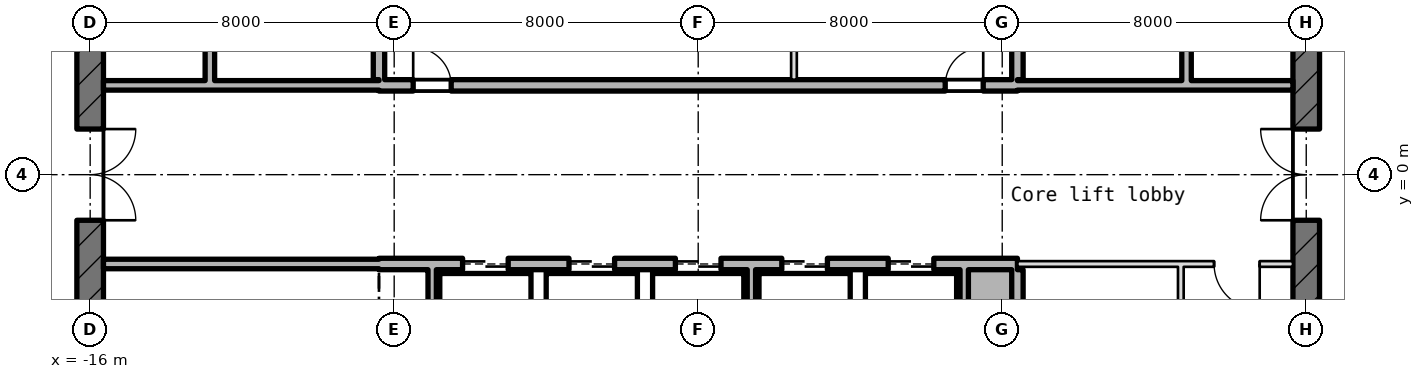
"""IFC4 building model, lengths in metres.
Left out: names, types, materials, properties, quantities, classifications, styles, units other than length and angle.
Written with IfcOpenShell. Run it as: python <this file> out.ifc"""

import sys

from ifc_helpers import new_model, si_unit, direction, frame, frame_2d, origin, place, context, subcontext, project, spatial, rectangle, extrude, element, fill, save


model = new_model("IFC4")
c1 = context("Model", 3, precision=1e-05, world=origin(), true_north=direction((0.0, 1.0)))
c2 = subcontext(c1, "Body", "Model", "MODEL_VIEW")
j1 = project(units=[si_unit("LENGTHUNIT", "METRE"), si_unit("PLANEANGLEUNIT", "RADIAN")], contexts=[c1])
p1 = place(None, origin())
s1 = spatial("IfcSite", under=j1, at=p1, CompositionType="ELEMENT")
p2 = place(p1, origin())
s2 = spatial("IfcBuilding", under=s1, at=p2, CompositionType="ELEMENT")
p3 = place(p2, frame((0.0, 0.0, 321.85)))
s3 = spatial("IfcBuildingStorey", under=s2, at=p3, CompositionType="ELEMENT", Elevation=321.85)
p4 = place(p3, frame((16.0, -10.145, -0.18), z_axis=(0.0, 0.0, 1.0), x_axis=(0.0, 1.0, 0.0)))
e1 = element("IfcWall", 1, at=p4, inside=s3, PredefinedType="SHEAR", context=c2, shape_type="SweptSolid", body=[
    extrude(rectangle(XDim=20.29, YDim=0.7, at=frame_2d((10.145, 0.0))), origin(), (0.0, 0.0, 1.0), 4.15),
])
p5 = place(p4, frame((8.945, 0.0, 0.18)))
e2 = element("IfcOpeningElement", 2, at=p5, cuts=e1, PredefinedType="OPENING", context=c2, shape_type="SweptSolid", body=[
    extrude(rectangle(XDim=2.4, YDim=2.1, at=frame_2d((1.2, 1.05))), frame((0.0, 0.36, 0.0), z_axis=(0.0, -1.0, 0.0), x_axis=(1.0, 0.0, 0.0)), (0.0, 0.0, 1.0), 0.72),
])
p6 = place(p4, frame((13.545, 0.0, 0.18)))
e3 = element("IfcOpeningElement", 3, at=p6, cuts=e1, PredefinedType="OPENING", context=c2, shape_type="SweptSolid", body=[
    extrude(rectangle(XDim=1.2, YDim=2.1, at=frame_2d((0.6, 1.05))), frame((0.0, 0.36, 0.0), z_axis=(0.0, -1.0, 0.0), x_axis=(1.0, 0.0, 0.0)), (0.0, 0.0, 1.0), 0.72),
])
p7 = place(p3, frame((-16.0, 10.145, -0.18), z_axis=(0.0, 0.0, 1.0), x_axis=(0.0, -1.0, 0.0)))
e4 = element("IfcWall", 4, at=p7, inside=s3, PredefinedType="SHEAR", context=c2, shape_type="SweptSolid", body=[
    extrude(rectangle(XDim=20.29, YDim=0.7, at=frame_2d((10.145, 0.0))), origin(), (0.0, 0.0, 1.0), 4.15),
])
p8 = place(p7, frame((8.945, 0.0, 0.18)))
e5 = element("IfcOpeningElement", 5, at=p8, cuts=e4, PredefinedType="OPENING", context=c2, shape_type="SweptSolid", body=[
    extrude(rectangle(XDim=2.4, YDim=2.1, at=frame_2d((1.2, 1.05))), frame((0.0, 0.36, 0.0), z_axis=(0.0, -1.0, 0.0), x_axis=(1.0, 0.0, 0.0)), (0.0, 0.0, 1.0), 0.72),
])
p9 = place(p7, frame((5.545, 0.0, 0.18)))
e6 = element("IfcOpeningElement", 6, at=p9, cuts=e4, PredefinedType="OPENING", context=c2, shape_type="SweptSolid", body=[
    extrude(rectangle(XDim=1.2, YDim=2.1, at=frame_2d((0.6, 1.05))), frame((0.0, 0.36, 0.0), z_axis=(0.0, -1.0, 0.0), x_axis=(1.0, 0.0, 0.0)), (0.0, 0.0, 1.0), 0.72),
])
p10 = place(p3, frame((-15.65, -2.35, 0.0), z_axis=(0.0, 0.0, 1.0), x_axis=(1.0, 0.0, 0.0)))
e7 = element("IfcWall", 7, at=p10, inside=s3, PredefinedType="STANDARD", context=c2, shape_type="SweptSolid", body=[
    extrude(rectangle(XDim=7.25, YDim=0.25, at=frame_2d((3.625, 0.0))), origin(), (0.0, 0.0, 1.0), 3.97),
])
p11 = place(p3, frame((-8.4, -2.35, -0.18), z_axis=(0.0, 0.0, 1.0), x_axis=(1.0, 0.0, 0.0)))
e8 = element("IfcWall", 8, at=p11, inside=s3, PredefinedType="SHEAR", context=c2, shape_type="SweptSolid", body=[
    extrude(rectangle(XDim=16.8, YDim=0.3, at=frame_2d((8.4, 0.0))), origin(), (0.0, 0.0, 1.0), 4.15),
])
p12 = place(p11, frame((2.2, 0.0, 0.18)))
e9 = element("IfcOpeningElement", 9, at=p12, cuts=e8, PredefinedType="OPENING", context=c2, shape_type="SweptSolid", body=[
    extrude(rectangle(XDim=1.2, YDim=2.1, at=frame_2d((0.6, 1.05))), frame((0.0, 0.16, 0.0), z_axis=(0.0, -1.0, 0.0), x_axis=(1.0, 0.0, 0.0)), (0.0, 0.0, 1.0), 0.32),
])
p13 = place(p11, frame((5.0, 0.0, 0.18)))
e10 = element("IfcOpeningElement", 10, at=p13, cuts=e8, PredefinedType="OPENING", context=c2, shape_type="SweptSolid", body=[
    extrude(rectangle(XDim=1.2, YDim=2.1, at=frame_2d((0.6, 1.05))), frame((0.0, 0.16, 0.0), z_axis=(0.0, -1.0, 0.0), x_axis=(1.0, 0.0, 0.0)), (0.0, 0.0, 1.0), 0.32),
])
p14 = place(p11, frame((7.8, 0.0, 0.18)))
e11 = element("IfcOpeningElement", 11, at=p14, cuts=e8, PredefinedType="OPENING", context=c2, shape_type="SweptSolid", body=[
    extrude(rectangle(XDim=1.2, YDim=2.1, at=frame_2d((0.6, 1.05))), frame((0.0, 0.16, 0.0), z_axis=(0.0, -1.0, 0.0), x_axis=(1.0, 0.0, 0.0)), (0.0, 0.0, 1.0), 0.32),
])
p15 = place(p11, frame((10.6, 0.0, 0.18)))
e12 = element("IfcOpeningElement", 12, at=p15, cuts=e8, PredefinedType="OPENING", context=c2, shape_type="SweptSolid", body=[
    extrude(rectangle(XDim=1.2, YDim=2.1, at=frame_2d((0.6, 1.05))), frame((0.0, 0.16, 0.0), z_axis=(0.0, -1.0, 0.0), x_axis=(1.0, 0.0, 0.0)), (0.0, 0.0, 1.0), 0.32),
])
p16 = place(p11, frame((13.4, 0.0, 0.18)))
e13 = element("IfcOpeningElement", 13, at=p16, cuts=e8, PredefinedType="OPENING", context=c2, shape_type="SweptSolid", body=[
    extrude(rectangle(XDim=1.2, YDim=2.1, at=frame_2d((0.6, 1.05))), frame((0.0, 0.16, 0.0), z_axis=(0.0, -1.0, 0.0), x_axis=(1.0, 0.0, 0.0)), (0.0, 0.0, 1.0), 0.32),
])
p17 = place(p3, frame((8.4, -2.35, 0.0), z_axis=(0.0, 0.0, 1.0), x_axis=(1.0, 0.0, 0.0)))
e14 = element("IfcWall", 14, at=p17, inside=s3, PredefinedType="PARTITIONING", context=c2, shape_type="SweptSolid", body=[
    extrude(rectangle(XDim=7.25, YDim=0.15, at=frame_2d((3.625, 0.0))), origin(), (0.0, 0.0, 1.0), 3.97),
])
p18 = place(p17, frame((5.175, 0.0, 0.0)))
e15 = element("IfcOpeningElement", 15, at=p18, cuts=e14, PredefinedType="OPENING", context=c2, shape_type="SweptSolid", body=[
    extrude(rectangle(XDim=1.2, YDim=2.1, at=frame_2d((0.6, 1.05))), frame((0.0, 0.085, 0.0), z_axis=(0.0, -1.0, 0.0), x_axis=(1.0, 0.0, 0.0)), (0.0, 0.0, 1.0), 0.17),
])
p19 = place(p3, frame((-15.65, 2.35, 0.0), z_axis=(0.0, 0.0, 1.0), x_axis=(1.0, 0.0, 0.0)))
e16 = element("IfcWall", 16, at=p19, inside=s3, PredefinedType="STANDARD", context=c2, shape_type="SweptSolid", body=[
    extrude(rectangle(XDim=7.25, YDim=0.25, at=frame_2d((3.625, 0.0))), origin(), (0.0, 0.0, 1.0), 3.97),
])
p20 = place(p3, frame((-8.4, 2.35, -0.18), z_axis=(0.0, 0.0, 1.0), x_axis=(1.0, 0.0, 0.0)))
e17 = element("IfcWall", 17, at=p20, inside=s3, PredefinedType="SHEAR", context=c2, shape_type="SweptSolid", body=[
    extrude(rectangle(XDim=16.8, YDim=0.3, at=frame_2d((8.4, 0.0))), origin(), (0.0, 0.0, 1.0), 4.15),
])
p21 = place(p20, frame((0.9, 0.0, 0.18)))
e18 = element("IfcOpeningElement", 18, at=p21, cuts=e17, PredefinedType="OPENING", context=c2, shape_type="SweptSolid", body=[
    extrude(rectangle(XDim=1.0, YDim=2.1, at=frame_2d((0.5, 1.05))), frame((0.0, 0.16, 0.0), z_axis=(0.0, -1.0, 0.0), x_axis=(1.0, 0.0, 0.0)), (0.0, 0.0, 1.0), 0.32),
])
p22 = place(p20, frame((14.9, 0.0, 0.18)))
e19 = element("IfcOpeningElement", 19, at=p22, cuts=e17, PredefinedType="OPENING", context=c2, shape_type="SweptSolid", body=[
    extrude(rectangle(XDim=1.0, YDim=2.1, at=frame_2d((0.5, 1.05))), frame((0.0, 0.16, 0.0), z_axis=(0.0, -1.0, 0.0), x_axis=(1.0, 0.0, 0.0)), (0.0, 0.0, 1.0), 0.32),
])
p23 = place(p3, frame((8.4, 2.35, 0.0), z_axis=(0.0, 0.0, 1.0), x_axis=(1.0, 0.0, 0.0)))
e20 = element("IfcWall", 20, at=p23, inside=s3, PredefinedType="STANDARD", context=c2, shape_type="SweptSolid", body=[
    extrude(rectangle(XDim=7.25, YDim=0.25, at=frame_2d((3.625, 0.0))), origin(), (0.0, 0.0, 1.0), 3.97),
])
p24 = place(p3, frame((-12.85, 2.475, 0.0), z_axis=(0.0, 0.0, 1.0), x_axis=(0.0, 1.0, 0.0)))
e21 = element("IfcWall", 21, at=p24, inside=s3, PredefinedType="STANDARD", context=c2, shape_type="SweptSolid", body=[
    extrude(rectangle(XDim=3.05, YDim=0.25, at=frame_2d((1.525, 0.0))), origin(), (0.0, 0.0, 1.0), 3.97),
])
p25 = place(p3, frame((-8.4, 2.5, -0.18), z_axis=(0.0, 0.0, 1.0), x_axis=(0.0, 1.0, 0.0)))
e22 = element("IfcWall", 22, at=p25, inside=s3, PredefinedType="SHEAR", context=c2, shape_type="SweptSolid", body=[
    extrude(rectangle(XDim=5.85, YDim=0.3, at=frame_2d((2.925, 0.0))), origin(), (0.0, 0.0, 1.0), 4.15),
])
for number, where, z_axis, x_axis in (
    (23, (-7.0, -5.24, 0.0), (0.0, 0.0, 1.0), (0.0, 1.0, 0.0)),
    (24, (1.4, -5.24, 0.0), (0.0, 0.0, 1.0), (0.0, 1.0, 0.0)),
):
    element("IfcWall", number, at=place(p3, frame(where, z_axis=z_axis, x_axis=x_axis)), inside=s3, PredefinedType="STANDARD", context=c2, shape_type="SweptSolid", body=[
        extrude(rectangle(XDim=2.74, YDim=0.22, at=frame_2d((1.37, 0.0))), origin(), (0.0, 0.0, 1.0), 3.97),
    ])
p26 = place(p3, frame((2.52, 2.5, 0.0), z_axis=(0.0, 0.0, 1.0), x_axis=(0.0, 1.0, 0.0)))
e25 = element("IfcWall", 25, at=p26, inside=s3, PredefinedType="PARTITIONING", context=c2, shape_type="SweptSolid", body=[
    extrude(rectangle(XDim=2.775, YDim=0.15, at=frame_2d((1.387, 0.0))), origin(), (0.0, 0.0, 1.0), 3.97),
])
p27 = place(p3, frame((7.0, -5.24, 0.0), z_axis=(0.0, 0.0, 1.0), x_axis=(0.0, 1.0, 0.0)))
e26 = element("IfcWall", 26, at=p27, inside=s3, PredefinedType="STANDARD", context=c2, shape_type="SweptSolid", body=[
    extrude(rectangle(XDim=2.74, YDim=0.22, at=frame_2d((1.37, 0.0))), origin(), (0.0, 0.0, 1.0), 3.97),
])
for number, where, z_axis, x_axis in (
    (27, (8.4, -8.35, -0.18), (0.0, 0.0, 1.0), (0.0, 1.0, 0.0)),
    (28, (8.4, 2.5, -0.18), (0.0, 0.0, 1.0), (0.0, 1.0, 0.0)),
):
    element("IfcWall", number, at=place(p3, frame(where, z_axis=z_axis, x_axis=x_axis)), inside=s3, PredefinedType="SHEAR", context=c2, shape_type="SweptSolid", body=[
        extrude(rectangle(XDim=5.85, YDim=0.3, at=frame_2d((2.925, 0.0))), origin(), (0.0, 0.0, 1.0), 4.15),
    ])
p28 = place(p3, frame((12.7, -12.65, 0.0), z_axis=(0.0, 0.0, 1.0), x_axis=(0.0, 1.0, 0.0)))
e29 = element("IfcWall", 29, at=p28, inside=s3, PredefinedType="PARTITIONING", context=c2, shape_type="SweptSolid", body=[
    extrude(rectangle(XDim=10.225, YDim=0.15, at=frame_2d((5.112, 0.0))), origin(), (0.0, 0.0, 1.0), 3.97),
])
p29 = place(p28, frame((7.975, 0.0, 0.0)))
e30 = element("IfcOpeningElement", 30, at=p29, cuts=e29, PredefinedType="OPENING", context=c2, shape_type="SweptSolid", body=[
    extrude(rectangle(XDim=1.0, YDim=2.1, at=frame_2d((0.5, 1.05))), frame((0.0, 0.085, 0.0), z_axis=(0.0, -1.0, 0.0), x_axis=(1.0, 0.0, 0.0)), (0.0, 0.0, 1.0), 0.17),
])
p30 = place(p28, frame((2.825, 0.0, 0.0)))
e31 = element("IfcOpeningElement", 31, at=p30, cuts=e29, PredefinedType="OPENING", context=c2, shape_type="SweptSolid", body=[
    extrude(rectangle(XDim=1.0, YDim=2.1, at=frame_2d((0.5, 1.05))), frame((0.0, 0.085, 0.0), z_axis=(0.0, -1.0, 0.0), x_axis=(1.0, 0.0, 0.0)), (0.0, 0.0, 1.0), 0.17),
])
p31 = place(p3, frame((12.85, 2.475, 0.0), z_axis=(0.0, 0.0, 1.0), x_axis=(0.0, 1.0, 0.0)))
e32 = element("IfcWall", 32, at=p31, inside=s3, PredefinedType="STANDARD", context=c2, shape_type="SweptSolid", body=[
    extrude(rectangle(XDim=3.05, YDim=0.25, at=frame_2d((1.525, 0.0))), origin(), (0.0, 0.0, 1.0), 3.97),
])
p32 = place(p12, origin())
e33 = element("IfcDoor", 33, at=p32, inside=s3, OperationType="DOUBLE_DOOR_SLIDING", PredefinedType="DOOR", context=c2, shape_type="SweptSolid", body=[
    extrude(rectangle(XDim=1.2, YDim=2.1, at=frame_2d((0.6, 1.05))), frame((0.0, 0.025, 0.0), z_axis=(0.0, -1.0, 0.0), x_axis=(1.0, 0.0, 0.0)), (0.0, 0.0, 1.0), 0.05),
])
fill(e9, e33)
p33 = place(p13, origin())
e34 = element("IfcDoor", 34, at=p33, inside=s3, OperationType="DOUBLE_DOOR_SLIDING", PredefinedType="DOOR", context=c2, shape_type="SweptSolid", body=[
    extrude(rectangle(XDim=1.2, YDim=2.1, at=frame_2d((0.6, 1.05))), frame((0.0, 0.025, 0.0), z_axis=(0.0, -1.0, 0.0), x_axis=(1.0, 0.0, 0.0)), (0.0, 0.0, 1.0), 0.05),
])
fill(e10, e34)
p34 = place(p14, origin())
e35 = element("IfcDoor", 35, at=p34, inside=s3, OperationType="DOUBLE_DOOR_SLIDING", PredefinedType="DOOR", context=c2, shape_type="SweptSolid", body=[
    extrude(rectangle(XDim=1.2, YDim=2.1, at=frame_2d((0.6, 1.05))), frame((0.0, 0.025, 0.0), z_axis=(0.0, -1.0, 0.0), x_axis=(1.0, 0.0, 0.0)), (0.0, 0.0, 1.0), 0.05),
])
fill(e11, e35)
p35 = place(p15, origin())
e36 = element("IfcDoor", 36, at=p35, inside=s3, OperationType="DOUBLE_DOOR_SLIDING", PredefinedType="DOOR", context=c2, shape_type="SweptSolid", body=[
    extrude(rectangle(XDim=1.2, YDim=2.1, at=frame_2d((0.6, 1.05))), frame((0.0, 0.025, 0.0), z_axis=(0.0, -1.0, 0.0), x_axis=(1.0, 0.0, 0.0)), (0.0, 0.0, 1.0), 0.05),
])
fill(e12, e36)
p36 = place(p16, origin())
e37 = element("IfcDoor", 37, at=p36, inside=s3, OperationType="DOUBLE_DOOR_SLIDING", PredefinedType="DOOR", context=c2, shape_type="SweptSolid", body=[
    extrude(rectangle(XDim=1.2, YDim=2.1, at=frame_2d((0.6, 1.05))), frame((0.0, 0.025, 0.0), z_axis=(0.0, -1.0, 0.0), x_axis=(1.0, 0.0, 0.0)), (0.0, 0.0, 1.0), 0.05),
])
fill(e13, e37)
p37 = place(p8, origin())
e38 = element("IfcDoor", 38, at=p37, inside=s3, OperationType="DOUBLE_DOOR_SINGLE_SWING", PredefinedType="DOOR", context=c2, shape_type="SweptSolid", body=[
    extrude(rectangle(XDim=2.4, YDim=2.1, at=frame_2d((1.2, 1.05))), frame((0.0, 0.025, 0.0), z_axis=(0.0, -1.0, 0.0), x_axis=(1.0, 0.0, 0.0)), (0.0, 0.0, 1.0), 0.05),
])
fill(e5, e38)
p38 = place(p5, origin())
e39 = element("IfcDoor", 39, at=p38, inside=s3, OperationType="DOUBLE_DOOR_SINGLE_SWING", PredefinedType="DOOR", context=c2, shape_type="SweptSolid", body=[
    extrude(rectangle(XDim=2.4, YDim=2.1, at=frame_2d((1.2, 1.05))), frame((0.0, 0.025, 0.0), z_axis=(0.0, -1.0, 0.0), x_axis=(1.0, 0.0, 0.0)), (0.0, 0.0, 1.0), 0.05),
])
fill(e2, e39)
p39 = place(p21, origin())
e40 = element("IfcDoor", 40, at=p39, inside=s3, OperationType="SINGLE_SWING_RIGHT", PredefinedType="DOOR", context=c2, shape_type="SweptSolid", body=[
    extrude(rectangle(XDim=1.0, YDim=2.1, at=frame_2d((0.5, 1.05))), frame((0.0, 0.025, 0.0), z_axis=(0.0, -1.0, 0.0), x_axis=(1.0, 0.0, 0.0)), (0.0, 0.0, 1.0), 0.05),
])
fill(e18, e40)
p40 = place(p22, origin())
e41 = element("IfcDoor", 41, at=p40, inside=s3, OperationType="SINGLE_SWING_RIGHT", PredefinedType="DOOR", context=c2, shape_type="SweptSolid", body=[
    extrude(rectangle(XDim=1.0, YDim=2.1, at=frame_2d((0.5, 1.05))), frame((0.0, 0.025, 0.0), z_axis=(0.0, -1.0, 0.0), x_axis=(1.0, 0.0, 0.0)), (0.0, 0.0, 1.0), 0.05),
])
fill(e19, e41)
p41 = place(p18, frame((1.2, 0.0, 0.0), z_axis=(0.0, 0.0, 1.0), x_axis=(-1.0, 0.0, 0.0)))
e42 = element("IfcDoor", 42, at=p41, inside=s3, OperationType="SINGLE_SWING_LEFT", PredefinedType="DOOR", context=c2, shape_type="SweptSolid", body=[
    extrude(rectangle(XDim=1.2, YDim=2.1, at=frame_2d((0.6, 1.05))), frame((0.0, 0.025, 0.0), z_axis=(0.0, -1.0, 0.0), x_axis=(1.0, 0.0, 0.0)), (0.0, 0.0, 1.0), 0.05),
])
fill(e15, e42)
save(model, sys.argv[1])
